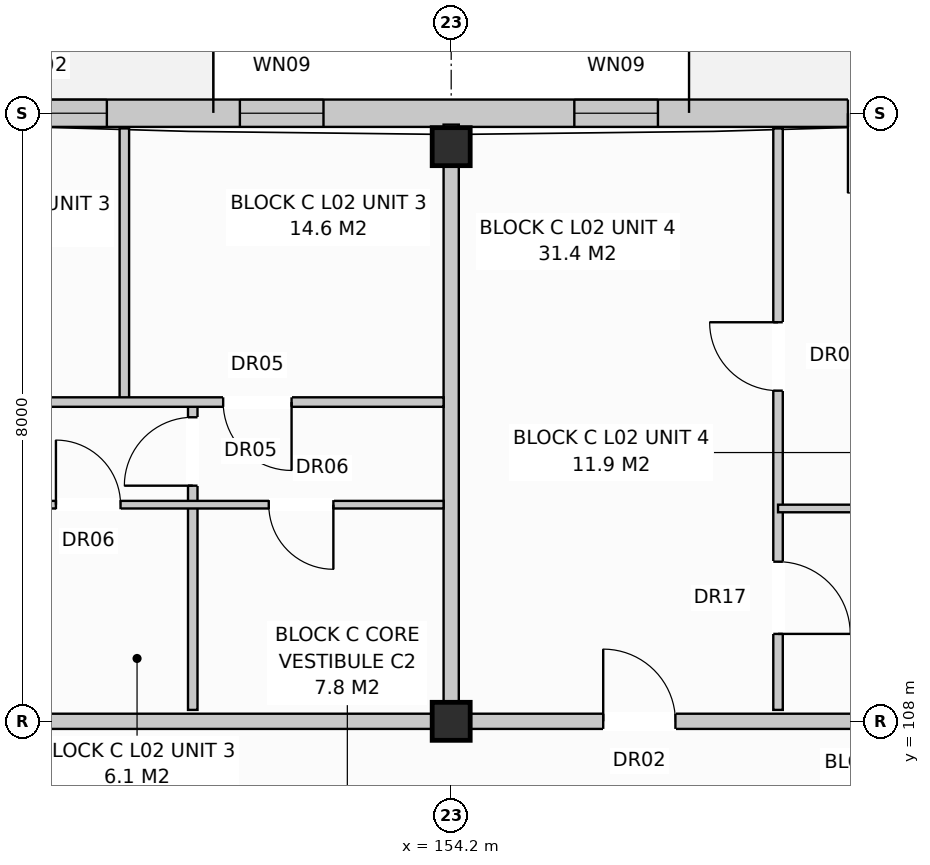
"""IFC4 building model, lengths in metres.
Left out: names, types, materials, properties, quantities, classifications, styles, units other than length and angle.
Written with IfcOpenShell. Run it as: python <this file> out.ifc"""

import sys

from ifc_helpers import new_model, si_unit, direction, frame, frame_2d, origin, origin_with_axes, origin_2d, place, context, subcontext, project, spatial, rectangle, extrude, element, fill, save


model = new_model("IFC4")
c1 = context("Model", 3, precision=1e-05, world=origin(), true_north=direction((0.0, 1.0)))
c2 = subcontext(c1, "Body", "Model", "MODEL_VIEW")
j1 = project(units=[si_unit("LENGTHUNIT", "METRE"), si_unit("PLANEANGLEUNIT", "RADIAN")], contexts=[c1])
p1 = place(None, origin())
s1 = spatial("IfcSite", under=j1, at=p1, CompositionType="ELEMENT")
p2 = place(p1, origin())
s2 = spatial("IfcBuilding", under=s1, at=p2, CompositionType="ELEMENT")
p3 = place(p2, frame((0.0, 0.0, 8.0)))
s3 = spatial("IfcBuildingStorey", under=s2, at=p3, CompositionType="ELEMENT", Elevation=8.0)
for number, where, z_axis, x_axis in (
    (1, (154.2, 108.0, 0.0), (0.0, 0.0, 1.0), (1.0, 0.0, 0.0)),
    (2, (154.2, 115.56, 0.0), (0.0, 0.0, 1.0), (1.0, 0.0, 0.0)),
):
    element("IfcColumn", number, at=place(p3, frame(where, z_axis=z_axis, x_axis=x_axis)), inside=s3, PredefinedType="COLUMN", context=c2, shape_type="SweptSolid", body=[
        extrude(rectangle(XDim=0.5, YDim=0.5, at=origin_2d()), origin(), (0.0, 0.0, 1.0), 3.2),
    ])
p4 = place(p3, frame((112.97, 116.0, 0.0), z_axis=(0.0, 0.0, 1.0), x_axis=(1.0, 0.0, 0.0)))
e3 = element("IfcWall", 3, at=p4, inside=s3, PredefinedType="STANDARD", context=c2, shape_type="SweptSolid", body=[
    extrude(rectangle(XDim=54.86, YDim=0.36, at=frame_2d((27.43, 0.0))), origin(), (0.0, 0.0, 1.0), 2.94),
])
p5 = place(p4, frame((4.876, 0.0, 0.0)))
e4 = element("IfcOpeningElement", 4, at=p5, cuts=e3, PredefinedType="OPENING", context=c2, shape_type="SweptSolid", body=[
    extrude(rectangle(XDim=1.05, YDim=2.12, at=frame_2d((0.525, 1.06))), frame((0.0, 0.192, 0.0), z_axis=(0.0, -1.0, 0.0), x_axis=(1.0, 0.0, 0.0)), (0.0, 0.0, 1.0), 0.384),
])
p6 = place(p4, frame((18.879, 0.0, 0.0)))
e5 = element("IfcOpeningElement", 5, at=p6, cuts=e3, PredefinedType="OPENING", context=c2, shape_type="SweptSolid", body=[
    extrude(rectangle(XDim=1.05, YDim=2.12, at=frame_2d((0.525, 1.06))), frame((0.0, 0.192, 0.0), z_axis=(0.0, -1.0, 0.0), x_axis=(1.0, 0.0, 0.0)), (0.0, 0.0, 1.0), 0.384),
])
p7 = place(p4, frame((31.379, 0.0, 0.0)))
e6 = element("IfcOpeningElement", 6, at=p7, cuts=e3, PredefinedType="OPENING", context=c2, shape_type="SweptSolid", body=[
    extrude(rectangle(XDim=1.05, YDim=2.12, at=frame_2d((0.525, 1.06))), frame((0.0, 0.192, 0.0), z_axis=(0.0, -1.0, 0.0), x_axis=(1.0, 0.0, 0.0)), (0.0, 0.0, 1.0), 0.384),
])
p8 = place(p4, frame((46.45, 0.0, 0.0)))
e7 = element("IfcOpeningElement", 7, at=p8, cuts=e3, PredefinedType="OPENING", context=c2, shape_type="SweptSolid", body=[
    extrude(rectangle(XDim=1.05, YDim=2.12, at=frame_2d((0.525, 1.06))), frame((0.0, 0.192, 0.0), z_axis=(0.0, -1.0, 0.0), x_axis=(1.0, 0.0, 0.0)), (0.0, 0.0, 1.0), 0.384),
])
p9 = place(p4, frame((2.45, 0.0, 0.72)))
e8 = element("IfcOpeningElement", 8, at=p9, cuts=e3, PredefinedType="OPENING", context=c2, shape_type="SweptSolid", body=[
    extrude(rectangle(XDim=1.1, YDim=1.5, at=frame_2d((0.55, 0.75))), frame((0.0, 0.192, 0.0), z_axis=(0.0, -1.0, 0.0), x_axis=(1.0, 0.0, 0.0)), (0.0, 0.0, 1.0), 0.384),
])
p10 = place(p4, frame((7.8, 0.0, 0.8)))
e9 = element("IfcOpeningElement", 9, at=p10, cuts=e3, PredefinedType="OPENING", context=c2, shape_type="SweptSolid", body=[
    extrude(rectangle(XDim=1.8, YDim=1.7, at=frame_2d((0.9, 0.85))), frame((0.0, 0.192, 0.0), z_axis=(0.0, -1.0, 0.0), x_axis=(1.0, 0.0, 0.0)), (0.0, 0.0, 1.0), 0.384),
])
p11 = place(p4, frame((14.55, 0.0, 0.72)))
e10 = element("IfcOpeningElement", 10, at=p11, cuts=e3, PredefinedType="OPENING", context=c2, shape_type="SweptSolid", body=[
    extrude(rectangle(XDim=1.1, YDim=1.5, at=frame_2d((0.55, 0.75))), frame((0.0, 0.192, 0.0), z_axis=(0.0, -1.0, 0.0), x_axis=(1.0, 0.0, 0.0)), (0.0, 0.0, 1.0), 0.384),
])
p12 = place(p4, frame((16.75, 0.0, 0.8)))
e11 = element("IfcOpeningElement", 11, at=p12, cuts=e3, PredefinedType="OPENING", context=c2, shape_type="SweptSolid", body=[
    extrude(rectangle(XDim=1.9, YDim=1.85, at=frame_2d((0.95, 0.925))), frame((0.0, 0.192, 0.0), z_axis=(0.0, -1.0, 0.0), x_axis=(1.0, 0.0, 0.0)), (0.0, 0.0, 1.0), 0.384),
])
p13 = place(p4, frame((21.6, 0.0, 0.8)))
e12 = element("IfcOpeningElement", 12, at=p13, cuts=e3, PredefinedType="OPENING", context=c2, shape_type="SweptSolid", body=[
    extrude(rectangle(XDim=1.8, YDim=1.7, at=frame_2d((0.9, 0.85))), frame((0.0, 0.192, 0.0), z_axis=(0.0, -1.0, 0.0), x_axis=(1.0, 0.0, 0.0)), (0.0, 0.0, 1.0), 0.384),
])
p14 = place(p4, frame((25.35, 0.0, 0.72)))
e13 = element("IfcOpeningElement", 13, at=p14, cuts=e3, PredefinedType="OPENING", context=c2, shape_type="SweptSolid", body=[
    extrude(rectangle(XDim=1.1, YDim=1.5, at=frame_2d((0.55, 0.75))), frame((0.0, 0.192, 0.0), z_axis=(0.0, -1.0, 0.0), x_axis=(1.0, 0.0, 0.0)), (0.0, 0.0, 1.0), 0.384),
])
p15 = place(p4, frame((29.55, 0.0, 0.72)))
e14 = element("IfcOpeningElement", 14, at=p15, cuts=e3, PredefinedType="OPENING", context=c2, shape_type="SweptSolid", body=[
    extrude(rectangle(XDim=1.1, YDim=1.5, at=frame_2d((0.55, 0.75))), frame((0.0, 0.192, 0.0), z_axis=(0.0, -1.0, 0.0), x_axis=(1.0, 0.0, 0.0)), (0.0, 0.0, 1.0), 0.384),
])
p16 = place(p4, frame((34.9, 0.0, 0.8)))
e15 = element("IfcOpeningElement", 15, at=p16, cuts=e3, PredefinedType="OPENING", context=c2, shape_type="SweptSolid", body=[
    extrude(rectangle(XDim=1.8, YDim=1.7, at=frame_2d((0.9, 0.85))), frame((0.0, 0.192, 0.0), z_axis=(0.0, -1.0, 0.0), x_axis=(1.0, 0.0, 0.0)), (0.0, 0.0, 1.0), 0.384),
])
p17 = place(p4, frame((38.45, 0.0, 0.72)))
e16 = element("IfcOpeningElement", 16, at=p17, cuts=e3, PredefinedType="OPENING", context=c2, shape_type="SweptSolid", body=[
    extrude(rectangle(XDim=1.1, YDim=1.5, at=frame_2d((0.55, 0.75))), frame((0.0, 0.192, 0.0), z_axis=(0.0, -1.0, 0.0), x_axis=(1.0, 0.0, 0.0)), (0.0, 0.0, 1.0), 0.384),
])
p18 = place(p4, frame((42.85, 0.0, 0.72)))
e17 = element("IfcOpeningElement", 17, at=p18, cuts=e3, PredefinedType="OPENING", context=c2, shape_type="SweptSolid", body=[
    extrude(rectangle(XDim=1.1, YDim=1.5, at=frame_2d((0.55, 0.75))), frame((0.0, 0.192, 0.0), z_axis=(0.0, -1.0, 0.0), x_axis=(1.0, 0.0, 0.0)), (0.0, 0.0, 1.0), 0.384),
])
p19 = place(p4, frame((49.2, 0.0, 0.8)))
e18 = element("IfcOpeningElement", 18, at=p19, cuts=e3, PredefinedType="OPENING", context=c2, shape_type="SweptSolid", body=[
    extrude(rectangle(XDim=1.8, YDim=1.7, at=frame_2d((0.9, 0.85))), frame((0.0, 0.192, 0.0), z_axis=(0.0, -1.0, 0.0), x_axis=(1.0, 0.0, 0.0)), (0.0, 0.0, 1.0), 0.384),
])
p20 = place(p4, frame((52.95, 0.0, 0.72)))
e19 = element("IfcOpeningElement", 19, at=p20, cuts=e3, PredefinedType="OPENING", context=c2, shape_type="SweptSolid", body=[
    extrude(rectangle(XDim=1.1, YDim=1.5, at=frame_2d((0.55, 0.75))), frame((0.0, 0.192, 0.0), z_axis=(0.0, -1.0, 0.0), x_axis=(1.0, 0.0, 0.0)), (0.0, 0.0, 1.0), 0.384),
])
p21 = place(p3, frame((154.2, 108.15, 0.0), z_axis=(0.0, 0.0, 1.0), x_axis=(0.0, 1.0, 0.0)))
e20 = element("IfcWall", 20, at=p21, inside=s3, PredefinedType="PARTITIONING", context=c2, shape_type="SweptSolid", body=[
    extrude(rectangle(XDim=7.7, YDim=0.2, at=frame_2d((3.85, 0.0))), origin(), (0.0, 0.0, 1.0), 2.94),
])
p22 = place(p3, frame((140.4, 108.0, 0.0), z_axis=(0.0, 0.0, 1.0), x_axis=(1.0, 0.0, 0.0)))
e21 = element("IfcWall", 21, at=p22, inside=s3, PredefinedType="PARTITIONING", context=c2, shape_type="SweptSolid", body=[
    extrude(rectangle(XDim=13.8, YDim=0.2, at=frame_2d((6.9, 0.0))), origin(), (0.0, 0.0, 1.0), 2.38),
])
p23 = place(p22, frame((2.4, 0.0, 0.0)))
e22 = element("IfcOpeningElement", 22, at=p23, cuts=e21, PredefinedType="OPENING", context=c2, shape_type="SweptSolid", body=[
    extrude(rectangle(XDim=0.95, YDim=2.15, at=frame_2d((0.475, 1.075))), frame((0.0, 0.112, 0.0), z_axis=(0.0, -1.0, 0.0), x_axis=(1.0, 0.0, 0.0)), (0.0, 0.0, 1.0), 0.224),
])
p24 = place(p3, frame((150.8, 108.15, 0.0), z_axis=(0.0, 0.0, 1.0), x_axis=(0.0, 1.0, 0.0)))
e23 = element("IfcWall", 23, at=p24, inside=s3, PredefinedType="PARTITIONING", context=c2, shape_type="SweptSolid", body=[
    extrude(rectangle(XDim=4.05, YDim=0.125, at=frame_2d((2.025, 0.0))), origin(), (0.0, 0.0, 1.0), 2.94),
])
p25 = place(p24, frame((2.95, 0.0, 0.0)))
e24 = element("IfcOpeningElement", 24, at=p25, cuts=e23, PredefinedType="OPENING", context=c2, shape_type="SweptSolid", body=[
    extrude(rectangle(XDim=0.9, YDim=2.1, at=frame_2d((0.45, 1.05))), frame((0.0, 0.074, 0.0), z_axis=(0.0, -1.0, 0.0), x_axis=(1.0, 0.0, 0.0)), (0.0, 0.0, 1.0), 0.149),
])
p26 = place(p3, frame((149.9, 112.2, 0.0), z_axis=(0.0, 0.0, 1.0), x_axis=(0.0, 1.0, 0.0)))
e25 = element("IfcWall", 25, at=p26, inside=s3, PredefinedType="PARTITIONING", context=c2, shape_type="SweptSolid", body=[
    extrude(rectangle(XDim=3.6, YDim=0.125, at=frame_2d((1.8, 0.0))), origin(), (0.0, 0.0, 1.0), 2.94),
])
p27 = place(p3, frame((145.6, 110.85, 0.0), z_axis=(0.0, 0.0, 1.0), x_axis=(1.0, 0.0, 0.0)))
e26 = element("IfcWall", 26, at=p27, inside=s3, PredefinedType="PARTITIONING", context=c2, shape_type="SweptSolid", body=[
    extrude(rectangle(XDim=8.5, YDim=0.1, at=frame_2d((4.25, 0.0))), origin(), (0.0, 0.0, 1.0), 2.94),
])
p28 = place(p27, frame((1.0, 0.0, 0.0)))
e27 = element("IfcOpeningElement", 27, at=p28, cuts=e26, PredefinedType="OPENING", context=c2, shape_type="SweptSolid", body=[
    extrude(rectangle(XDim=0.85, YDim=2.1, at=frame_2d((0.425, 1.05))), frame((0.0, 0.062, 0.0), z_axis=(0.0, -1.0, 0.0), x_axis=(1.0, 0.0, 0.0)), (0.0, 0.0, 1.0), 0.124),
])
p29 = place(p27, frame((3.4, 0.0, 0.0)))
e28 = element("IfcOpeningElement", 28, at=p29, cuts=e26, PredefinedType="OPENING", context=c2, shape_type="SweptSolid", body=[
    extrude(rectangle(XDim=0.85, YDim=2.05, at=frame_2d((0.425, 1.025))), frame((0.0, 0.062, 0.0), z_axis=(0.0, -1.0, 0.0), x_axis=(1.0, 0.0, 0.0)), (0.0, 0.0, 1.0), 0.124),
])
p30 = place(p27, frame((6.2, 0.0, 0.0)))
e29 = element("IfcOpeningElement", 29, at=p30, cuts=e26, PredefinedType="OPENING", context=c2, shape_type="SweptSolid", body=[
    extrude(rectangle(XDim=0.85, YDim=2.05, at=frame_2d((0.425, 1.025))), frame((0.0, 0.062, 0.0), z_axis=(0.0, -1.0, 0.0), x_axis=(1.0, 0.0, 0.0)), (0.0, 0.0, 1.0), 0.124),
])
p31 = place(p3, frame((145.6, 112.2, 0.0), z_axis=(0.0, 0.0, 1.0), x_axis=(1.0, 0.0, 0.0)))
e30 = element("IfcWall", 30, at=p31, inside=s3, PredefinedType="PARTITIONING", context=c2, shape_type="SweptSolid", body=[
    extrude(rectangle(XDim=8.5, YDim=0.125, at=frame_2d((4.25, 0.0))), origin(), (0.0, 0.0, 1.0), 2.94),
])
p32 = place(p31, frame((1.5, 0.0, 0.0)))
e31 = element("IfcOpeningElement", 31, at=p32, cuts=e30, PredefinedType="OPENING", context=c2, shape_type="SweptSolid", body=[
    extrude(rectangle(XDim=0.9, YDim=2.1, at=frame_2d((0.45, 1.05))), frame((0.0, 0.074, 0.0), z_axis=(0.0, -1.0, 0.0), x_axis=(1.0, 0.0, 0.0)), (0.0, 0.0, 1.0), 0.149),
])
p33 = place(p31, frame((5.6, 0.0, 0.0)))
e32 = element("IfcOpeningElement", 32, at=p33, cuts=e30, PredefinedType="OPENING", context=c2, shape_type="SweptSolid", body=[
    extrude(rectangle(XDim=0.9, YDim=2.1, at=frame_2d((0.45, 1.05))), frame((0.0, 0.074, 0.0), z_axis=(0.0, -1.0, 0.0), x_axis=(1.0, 0.0, 0.0)), (0.0, 0.0, 1.0), 0.149),
])
p34 = place(p3, frame((154.2, 108.0, 0.0), z_axis=(0.0, 0.0, 1.0), x_axis=(1.0, 0.0, 0.0)))
e33 = element("IfcWall", 33, at=p34, inside=s3, PredefinedType="PARTITIONING", context=c2, shape_type="SweptSolid", body=[
    extrude(rectangle(XDim=6.9, YDim=0.2, at=frame_2d((3.45, 0.0))), origin(), (0.0, 0.0, 1.0), 2.38),
])
p35 = place(p34, frame((2.0, 0.0, 0.0)))
e34 = element("IfcOpeningElement", 34, at=p35, cuts=e33, PredefinedType="OPENING", context=c2, shape_type="SweptSolid", body=[
    extrude(rectangle(XDim=0.95, YDim=2.15, at=frame_2d((0.475, 1.075))), frame((0.0, 0.112, 0.0), z_axis=(0.0, -1.0, 0.0), x_axis=(1.0, 0.0, 0.0)), (0.0, 0.0, 1.0), 0.224),
])
p36 = place(p3, frame((158.5, 108.15, 0.0), z_axis=(0.0, 0.0, 1.0), x_axis=(0.0, 1.0, 0.0)))
e35 = element("IfcWall", 35, at=p36, inside=s3, PredefinedType="PARTITIONING", context=c2, shape_type="SweptSolid", body=[
    extrude(rectangle(XDim=7.65, YDim=0.125, at=frame_2d((3.825, 0.0))), origin(), (0.0, 0.0, 1.0), 2.94),
])
p37 = place(p36, frame((1.0, 0.0, 0.0)))
e36 = element("IfcOpeningElement", 36, at=p37, cuts=e35, PredefinedType="OPENING", context=c2, shape_type="SweptSolid", body=[
    extrude(rectangle(XDim=0.95, YDim=2.1, at=frame_2d((0.475, 1.05))), frame((0.0, 0.074, 0.0), z_axis=(0.0, -1.0, 0.0), x_axis=(1.0, 0.0, 0.0)), (0.0, 0.0, 1.0), 0.149),
])
p38 = place(p36, frame((4.2, 0.0, 0.0)))
e37 = element("IfcOpeningElement", 37, at=p38, cuts=e35, PredefinedType="OPENING", context=c2, shape_type="SweptSolid", body=[
    extrude(rectangle(XDim=0.9, YDim=2.1, at=frame_2d((0.45, 1.05))), frame((0.0, 0.074, 0.0), z_axis=(0.0, -1.0, 0.0), x_axis=(1.0, 0.0, 0.0)), (0.0, 0.0, 1.0), 0.149),
])
p39 = place(p3, frame((158.5, 110.8, 0.0), z_axis=(0.0, 0.0, 1.0), x_axis=(1.0, 0.0, 0.0)))
e38 = element("IfcWall", 38, at=p39, inside=s3, PredefinedType="PARTITIONING", context=c2, shape_type="SweptSolid", body=[
    extrude(rectangle(XDim=2.5, YDim=0.1, at=frame_2d((1.25, 0.0))), origin(), (0.0, 0.0, 1.0), 2.94),
])
p40 = place(p8, frame((1.05, 0.0, 0.0), z_axis=(0.0, 0.0, 1.0), x_axis=(-1.0, 0.0, 0.0)))
e39 = element("IfcDoor", 39, at=p40, inside=s3, OperationType="SINGLE_SWING_LEFT", PredefinedType="DOOR", context=c2, shape_type="SweptSolid", body=[
    extrude(rectangle(XDim=1.05, YDim=2.12, at=frame_2d((0.525, 1.06))), frame((0.0, 0.025, 0.0), z_axis=(0.0, -1.0, 0.0), x_axis=(1.0, 0.0, 0.0)), (0.0, 0.0, 1.0), 0.05),
])
fill(e7, e39)
p41 = place(p16, origin_with_axes())
e40 = element("IfcWindow", 40, at=p41, inside=s3, PartitioningType="SINGLE_PANEL", PredefinedType="WINDOW", context=c2, shape_type="SweptSolid", body=[
    extrude(rectangle(XDim=1.8, YDim=1.7, at=frame_2d((0.9, 0.85))), frame((0.0, 0.03, 0.0), z_axis=(0.0, -1.0, 0.0), x_axis=(1.0, 0.0, 0.0)), (0.0, 0.0, 1.0), 0.06),
])
fill(e15, e40)
p42 = place(p17, origin_with_axes())
e41 = element("IfcWindow", 41, at=p42, inside=s3, PartitioningType="SINGLE_PANEL", PredefinedType="WINDOW", context=c2, shape_type="SweptSolid", body=[
    extrude(rectangle(XDim=1.1, YDim=1.5, at=frame_2d((0.55, 0.75))), frame((0.0, 0.03, 0.0), z_axis=(0.0, -1.0, 0.0), x_axis=(1.0, 0.0, 0.0)), (0.0, 0.0, 1.0), 0.06),
])
fill(e16, e41)
p43 = place(p18, origin_with_axes())
e42 = element("IfcWindow", 42, at=p43, inside=s3, PartitioningType="SINGLE_PANEL", PredefinedType="WINDOW", context=c2, shape_type="SweptSolid", body=[
    extrude(rectangle(XDim=1.1, YDim=1.5, at=frame_2d((0.55, 0.75))), frame((0.0, 0.03, 0.0), z_axis=(0.0, -1.0, 0.0), x_axis=(1.0, 0.0, 0.0)), (0.0, 0.0, 1.0), 0.06),
])
fill(e17, e42)
p44 = place(p25, origin_with_axes())
e43 = element("IfcDoor", 43, at=p44, inside=s3, OperationType="SINGLE_SWING_LEFT", PredefinedType="DOOR", context=c2, shape_type="SweptSolid", body=[
    extrude(rectangle(XDim=0.9, YDim=2.1, at=frame_2d((0.45, 1.05))), frame((0.0, 0.025, 0.0), z_axis=(0.0, -1.0, 0.0), x_axis=(1.0, 0.0, 0.0)), (0.0, 0.0, 1.0), 0.05),
])
fill(e24, e43)
p45 = place(p29, origin_with_axes())
e44 = element("IfcDoor", 44, at=p45, inside=s3, OperationType="SINGLE_SWING_LEFT", PredefinedType="DOOR", context=c2, shape_type="SweptSolid", body=[
    extrude(rectangle(XDim=0.85, YDim=2.05, at=frame_2d((0.425, 1.025))), frame((0.0, 0.025, 0.0), z_axis=(0.0, -1.0, 0.0), x_axis=(1.0, 0.0, 0.0)), (0.0, 0.0, 1.0), 0.05),
])
fill(e28, e44)
p46 = place(p30, frame((0.85, 0.0, 0.0), z_axis=(0.0, 0.0, 1.0), x_axis=(-1.0, 0.0, 0.0)))
e45 = element("IfcDoor", 45, at=p46, inside=s3, OperationType="SINGLE_SWING_RIGHT", PredefinedType="DOOR", context=c2, shape_type="SweptSolid", body=[
    extrude(rectangle(XDim=0.85, YDim=2.05, at=frame_2d((0.425, 1.025))), frame((0.0, 0.025, 0.0), z_axis=(0.0, -1.0, 0.0), x_axis=(1.0, 0.0, 0.0)), (0.0, 0.0, 1.0), 0.05),
])
fill(e29, e45)
p47 = place(p33, frame((0.9, 0.0, 0.0), z_axis=(0.0, 0.0, 1.0), x_axis=(-1.0, 0.0, 0.0)))
e46 = element("IfcDoor", 46, at=p47, inside=s3, OperationType="SINGLE_SWING_RIGHT", PredefinedType="DOOR", context=c2, shape_type="SweptSolid", body=[
    extrude(rectangle(XDim=0.9, YDim=2.1, at=frame_2d((0.45, 1.05))), frame((0.0, 0.025, 0.0), z_axis=(0.0, -1.0, 0.0), x_axis=(1.0, 0.0, 0.0)), (0.0, 0.0, 1.0), 0.05),
])
fill(e32, e46)
p48 = place(p35, origin_with_axes())
e47 = element("IfcDoor", 47, at=p48, inside=s3, OperationType="SINGLE_SWING_LEFT", PredefinedType="DOOR", context=c2, shape_type="SweptSolid", body=[
    extrude(rectangle(XDim=0.95, YDim=2.15, at=frame_2d((0.475, 1.075))), frame((0.0, 0.025, 0.0), z_axis=(0.0, -1.0, 0.0), x_axis=(1.0, 0.0, 0.0)), (0.0, 0.0, 1.0), 0.05),
])
fill(e34, e47)
p49 = place(p37, frame((0.95, 0.0, 0.0), z_axis=(0.0, 0.0, 1.0), x_axis=(-1.0, 0.0, 0.0)))
e48 = element("IfcDoor", 48, at=p49, inside=s3, OperationType="SINGLE_SWING_LEFT", PredefinedType="DOOR", context=c2, shape_type="SweptSolid", body=[
    extrude(rectangle(XDim=0.95, YDim=2.1, at=frame_2d((0.475, 1.05))), frame((0.0, 0.025, 0.0), z_axis=(0.0, -1.0, 0.0), x_axis=(1.0, 0.0, 0.0)), (0.0, 0.0, 1.0), 0.05),
])
fill(e36, e48)
p50 = place(p38, origin_with_axes())
e49 = element("IfcDoor", 49, at=p50, inside=s3, OperationType="SINGLE_SWING_RIGHT", PredefinedType="DOOR", context=c2, shape_type="SweptSolid", body=[
    extrude(rectangle(XDim=0.9, YDim=2.1, at=frame_2d((0.45, 1.05))), frame((0.0, 0.025, 0.0), z_axis=(0.0, -1.0, 0.0), x_axis=(1.0, 0.0, 0.0)), (0.0, 0.0, 1.0), 0.05),
])
fill(e37, e49)
save(model, sys.argv[1])
